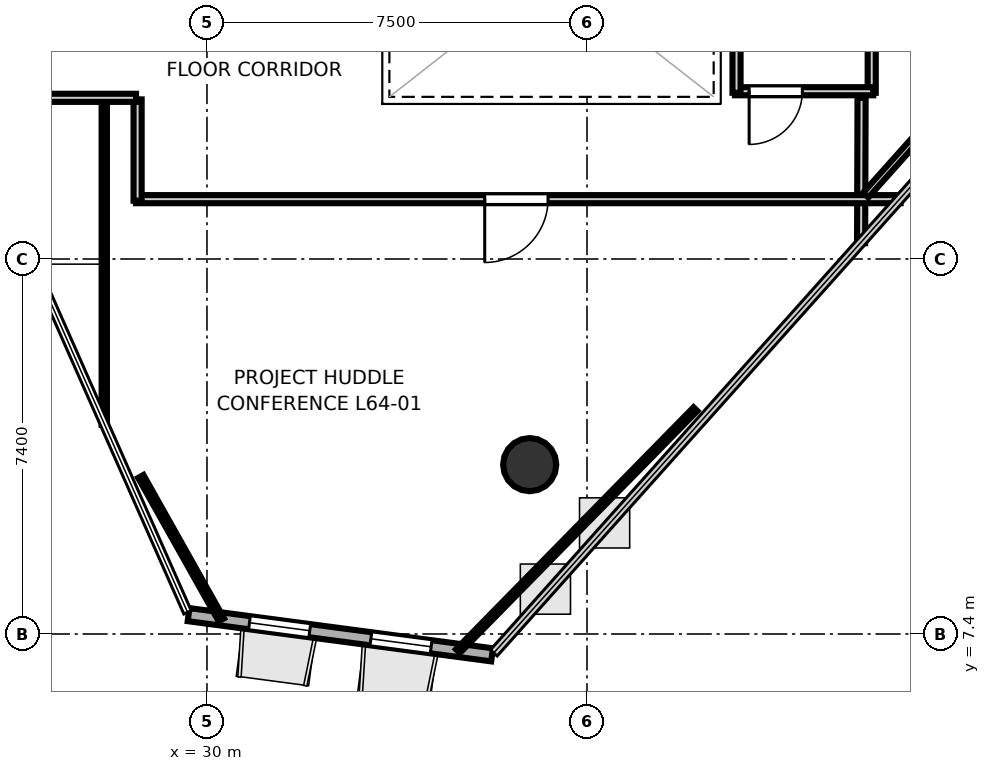
"""IFC4 building model, lengths in metres.
Left out: names, types, materials, properties, quantities, classifications, styles, units other than length and angle.
Written with IfcOpenShell. Run it as: python <this file> out.ifc"""

import sys

from ifc_helpers import new_model, si_unit, direction, frame, frame_2d, origin, origin_2d, place, context, subcontext, project, spatial, rectangle, hollow_circle, extrude, element, fill, save


model = new_model("IFC4")
c1 = context("Model", 3, precision=1e-05, world=origin(), true_north=direction((0.0, 1.0)))
c2 = subcontext(c1, "Body", "Model", "MODEL_VIEW")
j1 = project(units=[si_unit("LENGTHUNIT", "METRE"), si_unit("PLANEANGLEUNIT", "RADIAN")], contexts=[c1])
p1 = place(None, origin())
s1 = spatial("IfcSite", under=j1, at=p1, CompositionType="ELEMENT")
p2 = place(p1, origin())
s2 = spatial("IfcBuilding", under=s1, at=p2, CompositionType="ELEMENT")
p3 = place(p2, frame((0.0, 0.0, 250.1)))
s3 = spatial("IfcBuildingStorey", under=s2, at=p3, CompositionType="ELEMENT", Elevation=250.1)
p4 = place(p3, frame((36.369, 10.742, 0.0), z_axis=(0.0, 0.0, 1.0), x_axis=(1.0, 0.0, 0.0)))
e1 = element("IfcColumn", 1, at=p4, inside=s3, PredefinedType="COLUMN", context=c2, shape_type="SweptSolid", body=[
    extrude(hollow_circle(Radius=0.525, WallThickness=0.028, at=origin_2d()), origin(), (0.0, 0.0, 1.0), 3.7),
])
p5 = place(p3, frame((29.637, 7.782, 0.0), z_axis=(0.0, 0.0, 1.0), x_axis=(0.991339764782, -0.13132201172, 0.0)))
e2 = element("IfcWall", 2, at=p5, inside=s3, PredefinedType="SOLIDWALL", context=c2, shape_type="SweptSolid", body=[
    extrude(rectangle(XDim=6.042, YDim=0.26, at=frame_2d((3.021, 0.0))), origin(), (0.0, 0.0, 1.0), 3.52),
])
p6 = place(p5, frame((1.213, 0.0, 0.9)))
e3 = element("IfcOpeningElement", 3, at=p6, cuts=e2, PredefinedType="OPENING", context=c2, shape_type="SweptSolid", body=[
    extrude(rectangle(XDim=1.2, YDim=2.0, at=frame_2d((0.6, 1.0))), frame((0.0, 0.14, 0.0), z_axis=(0.0, -1.0, 0.0), x_axis=(1.0, 0.0, 0.0)), (0.0, 0.0, 1.0), 0.28),
])
p7 = place(p5, frame((3.629, 0.0, 0.9)))
e4 = element("IfcOpeningElement", 4, at=p7, cuts=e2, PredefinedType="OPENING", context=c2, shape_type="SweptSolid", body=[
    extrude(rectangle(XDim=1.2, YDim=2.0, at=frame_2d((0.6, 1.0))), frame((0.0, 0.14, 0.0), z_axis=(0.0, -1.0, 0.0), x_axis=(1.0, 0.0, 0.0)), (0.0, 0.0, 1.0), 0.28),
])
p8 = place(p3, frame((43.119, 22.05, 0.0), z_axis=(0.0, 0.0, 1.0), x_axis=(0.0, -1.0, 0.0)))
e5 = element("IfcWall", 5, at=p8, inside=s3, PredefinedType="PARTITIONING", context=c2, shape_type="SweptSolid", body=[
    extrude(rectangle(XDim=3.97, YDim=0.16, at=frame_2d((1.985, 0.0))), origin(), (0.0, 0.0, 1.0), 2.84),
])
p9 = place(p8, frame((0.94, 0.0, 0.0)))
e6 = element("IfcOpeningElement", 6, at=p9, cuts=e5, PredefinedType="OPENING", context=c2, shape_type="SweptSolid", body=[
    extrude(rectangle(XDim=1.25, YDim=2.2, at=frame_2d((0.625, 1.1))), frame((0.0, 0.09, 0.0), z_axis=(0.0, -1.0, 0.0), x_axis=(1.0, 0.0, 0.0)), (0.0, 0.0, 1.0), 0.18),
])
p10 = place(p3, frame((43.15, 18.111, 0.0), z_axis=(0.0, 0.0, 1.0), x_axis=(-1.0, 0.0, 0.0)))
e7 = element("IfcWall", 7, at=p10, inside=s3, PredefinedType="PARTITIONING", context=c2, shape_type="SweptSolid", body=[
    extrude(rectangle(XDim=2.73, YDim=0.16, at=frame_2d((1.365, 0.0))), origin(), (0.0, 0.0, 1.0), 2.84),
])
p11 = place(p10, frame((1.4, 0.0, 0.0)))
e8 = element("IfcOpeningElement", 8, at=p11, cuts=e7, PredefinedType="OPENING", context=c2, shape_type="SweptSolid", body=[
    extrude(rectangle(XDim=1.05, YDim=2.15, at=frame_2d((0.525, 1.075))), frame((0.0, 0.09, 0.0), z_axis=(0.0, -1.0, 0.0), x_axis=(1.0, 0.0, 0.0)), (0.0, 0.0, 1.0), 0.18),
])
p12 = place(p3, frame((40.451, 18.08, 0.0), z_axis=(0.0, 0.0, 1.0), x_axis=(0.0, 1.0, 0.0)))
e9 = element("IfcWall", 9, at=p12, inside=s3, PredefinedType="PARTITIONING", context=c2, shape_type="SweptSolid", body=[
    extrude(rectangle(XDim=3.32, YDim=0.16, at=frame_2d((1.66, 0.0))), origin(), (0.0, 0.0, 1.0), 2.84),
])
p13 = place(p3, frame((42.919, 17.98, 0.0), z_axis=(0.0, 0.0, 1.0), x_axis=(-0.003320260942, -0.999994487918, 0.0)))
e10 = element("IfcWall", 10, at=p13, inside=s3, PredefinedType="PARTITIONING", context=c2, shape_type="SweptSolid", body=[
    extrude(rectangle(XDim=2.868, YDim=0.16, at=frame_2d((1.434, 0.0))), origin(), (0.0, 0.0, 1.0), 2.84),
])
p14 = place(p3, frame((43.689, 15.981, 0.0), z_axis=(0.0, 0.0, 1.0), x_axis=(-1.0, 0.0, 0.0)))
e11 = element("IfcWall", 11, at=p14, inside=s3, PredefinedType="PARTITIONING", context=c2, shape_type="SweptSolid", body=[
    extrude(rectangle(XDim=15.089, YDim=0.16, at=frame_2d((7.544, 0.0))), origin(), (0.0, 0.0, 1.0), 2.84),
])
p15 = place(p14, frame((6.957, 0.0, 0.0)))
e12 = element("IfcOpeningElement", 12, at=p15, cuts=e11, PredefinedType="OPENING", context=c2, shape_type="SweptSolid", body=[
    extrude(rectangle(XDim=1.25, YDim=2.2, at=frame_2d((0.625, 1.1))), frame((0.0, 0.09, 0.0), z_axis=(0.0, -1.0, 0.0), x_axis=(1.0, 0.0, 0.0)), (0.0, 0.0, 1.0), 0.18),
])
p16 = place(p3, frame((28.631, 15.95, 0.0), z_axis=(0.0, 0.0, 1.0), x_axis=(0.0, 1.0, 0.0)))
e13 = element("IfcWall", 13, at=p16, inside=s3, PredefinedType="PARTITIONING", context=c2, shape_type="SweptSolid", body=[
    extrude(rectangle(XDim=2.0, YDim=0.16, at=frame_2d((1.0, 0.0))), origin(), (0.0, 0.0, 1.0), 2.84),
])
p17 = place(p3, frame((28.6, 17.981, 0.0), z_axis=(0.0, 0.0, 1.0), x_axis=(-1.0, 0.0, 0.0)))
e14 = element("IfcWall", 14, at=p17, inside=s3, PredefinedType="PARTITIONING", context=c2, shape_type="SweptSolid", body=[
    extrude(rectangle(XDim=1.95, YDim=0.16, at=frame_2d((0.975, 0.0))), origin(), (0.0, 0.0, 1.0), 2.84),
])
p18 = place(p3, frame((27.973, 11.527, 0.0), z_axis=(0.0, 0.0, 1.0), x_axis=(0.0, 1.0, 0.0)))
e15 = element("IfcWall", 15, at=p18, inside=s3, PredefinedType="PARTITIONING", context=c2, shape_type="SweptSolid", body=[
    extrude(rectangle(XDim=6.343, YDim=0.105, at=frame_2d((3.172, 0.0))), origin(), (0.0, 0.0, 1.0), 2.84),
])
p19 = place(p3, frame((39.64, 11.837, 0.0), z_axis=(0.0, 0.0, 1.0), x_axis=(-0.700528274192, -0.713624647177, 0.0)))
e16 = element("IfcWall", 16, at=p19, inside=s3, PredefinedType="PARTITIONING", context=c2, shape_type="SweptSolid", body=[
    extrude(rectangle(XDim=6.692, YDim=0.105, at=frame_2d((3.346, 0.0))), origin(), (0.0, 0.0, 1.0), 2.84),
])
p20 = place(p3, frame((30.284, 7.679, 0.0), z_axis=(0.0, 0.0, 1.0), x_axis=(-0.489914888538, 0.871770269044, 0.0)))
e17 = element("IfcWall", 17, at=p20, inside=s3, PredefinedType="PARTITIONING", context=c2, shape_type="SweptSolid", body=[
    extrude(rectangle(XDim=3.247, YDim=0.12, at=frame_2d((1.623, 0.0))), origin(), (0.0, 0.0, 1.0), 2.84),
])
p21 = place(p3, frame((47.06, 20.6, 0.0), z_axis=(0.0, 0.0, 1.0), x_axis=(-0.666617878576, -0.745399627021, 0.0)))
e18 = element("IfcWall", 18, at=p21, inside=s3, PredefinedType="PARTITIONING", context=c2, shape_type="SweptSolid", body=[
    extrude(rectangle(XDim=6.089, YDim=0.14, at=frame_2d((3.045, 0.0))), origin(), (0.0, 0.0, 1.0), 2.84),
])
p22 = place(p11, origin())
e19 = element("IfcDoor", 19, at=p22, inside=s3, OperationType="SINGLE_SWING_RIGHT", PredefinedType="DOOR", context=c2, shape_type="SweptSolid", body=[
    extrude(rectangle(XDim=1.05, YDim=2.15, at=frame_2d((0.525, 1.075))), frame((0.0, 0.025, 0.0), z_axis=(0.0, -1.0, 0.0), x_axis=(1.0, 0.0, 0.0)), (0.0, 0.0, 1.0), 0.05),
])
fill(e8, e19)
p23 = place(p15, origin())
e20 = element("IfcDoor", 20, at=p23, inside=s3, OperationType="SINGLE_SWING_RIGHT", PredefinedType="DOOR", context=c2, shape_type="SweptSolid", body=[
    extrude(rectangle(XDim=1.25, YDim=2.2, at=frame_2d((0.625, 1.1))), frame((0.0, 0.025, 0.0), z_axis=(0.0, -1.0, 0.0), x_axis=(1.0, 0.0, 0.0)), (0.0, 0.0, 1.0), 0.05),
])
fill(e12, e20)
p24 = place(p6, origin())
e21 = element("IfcWindow", 21, at=p24, inside=s3, PartitioningType="SINGLE_PANEL", PredefinedType="WINDOW", context=c2, shape_type="SweptSolid", body=[
    extrude(rectangle(XDim=1.2, YDim=2.0, at=frame_2d((0.6, 1.0))), frame((0.0, 0.03, 0.0), z_axis=(0.0, -1.0, 0.0), x_axis=(1.0, 0.0, 0.0)), (0.0, 0.0, 1.0), 0.06),
])
fill(e3, e21)
p25 = place(p7, origin())
e22 = element("IfcWindow", 22, at=p25, inside=s3, PartitioningType="SINGLE_PANEL", PredefinedType="WINDOW", context=c2, shape_type="SweptSolid", body=[
    extrude(rectangle(XDim=1.2, YDim=2.0, at=frame_2d((0.6, 1.0))), frame((0.0, 0.03, 0.0), z_axis=(0.0, -1.0, 0.0), x_axis=(1.0, 0.0, 0.0)), (0.0, 0.0, 1.0), 0.06),
])
fill(e4, e22)
save(model, sys.argv[1])
